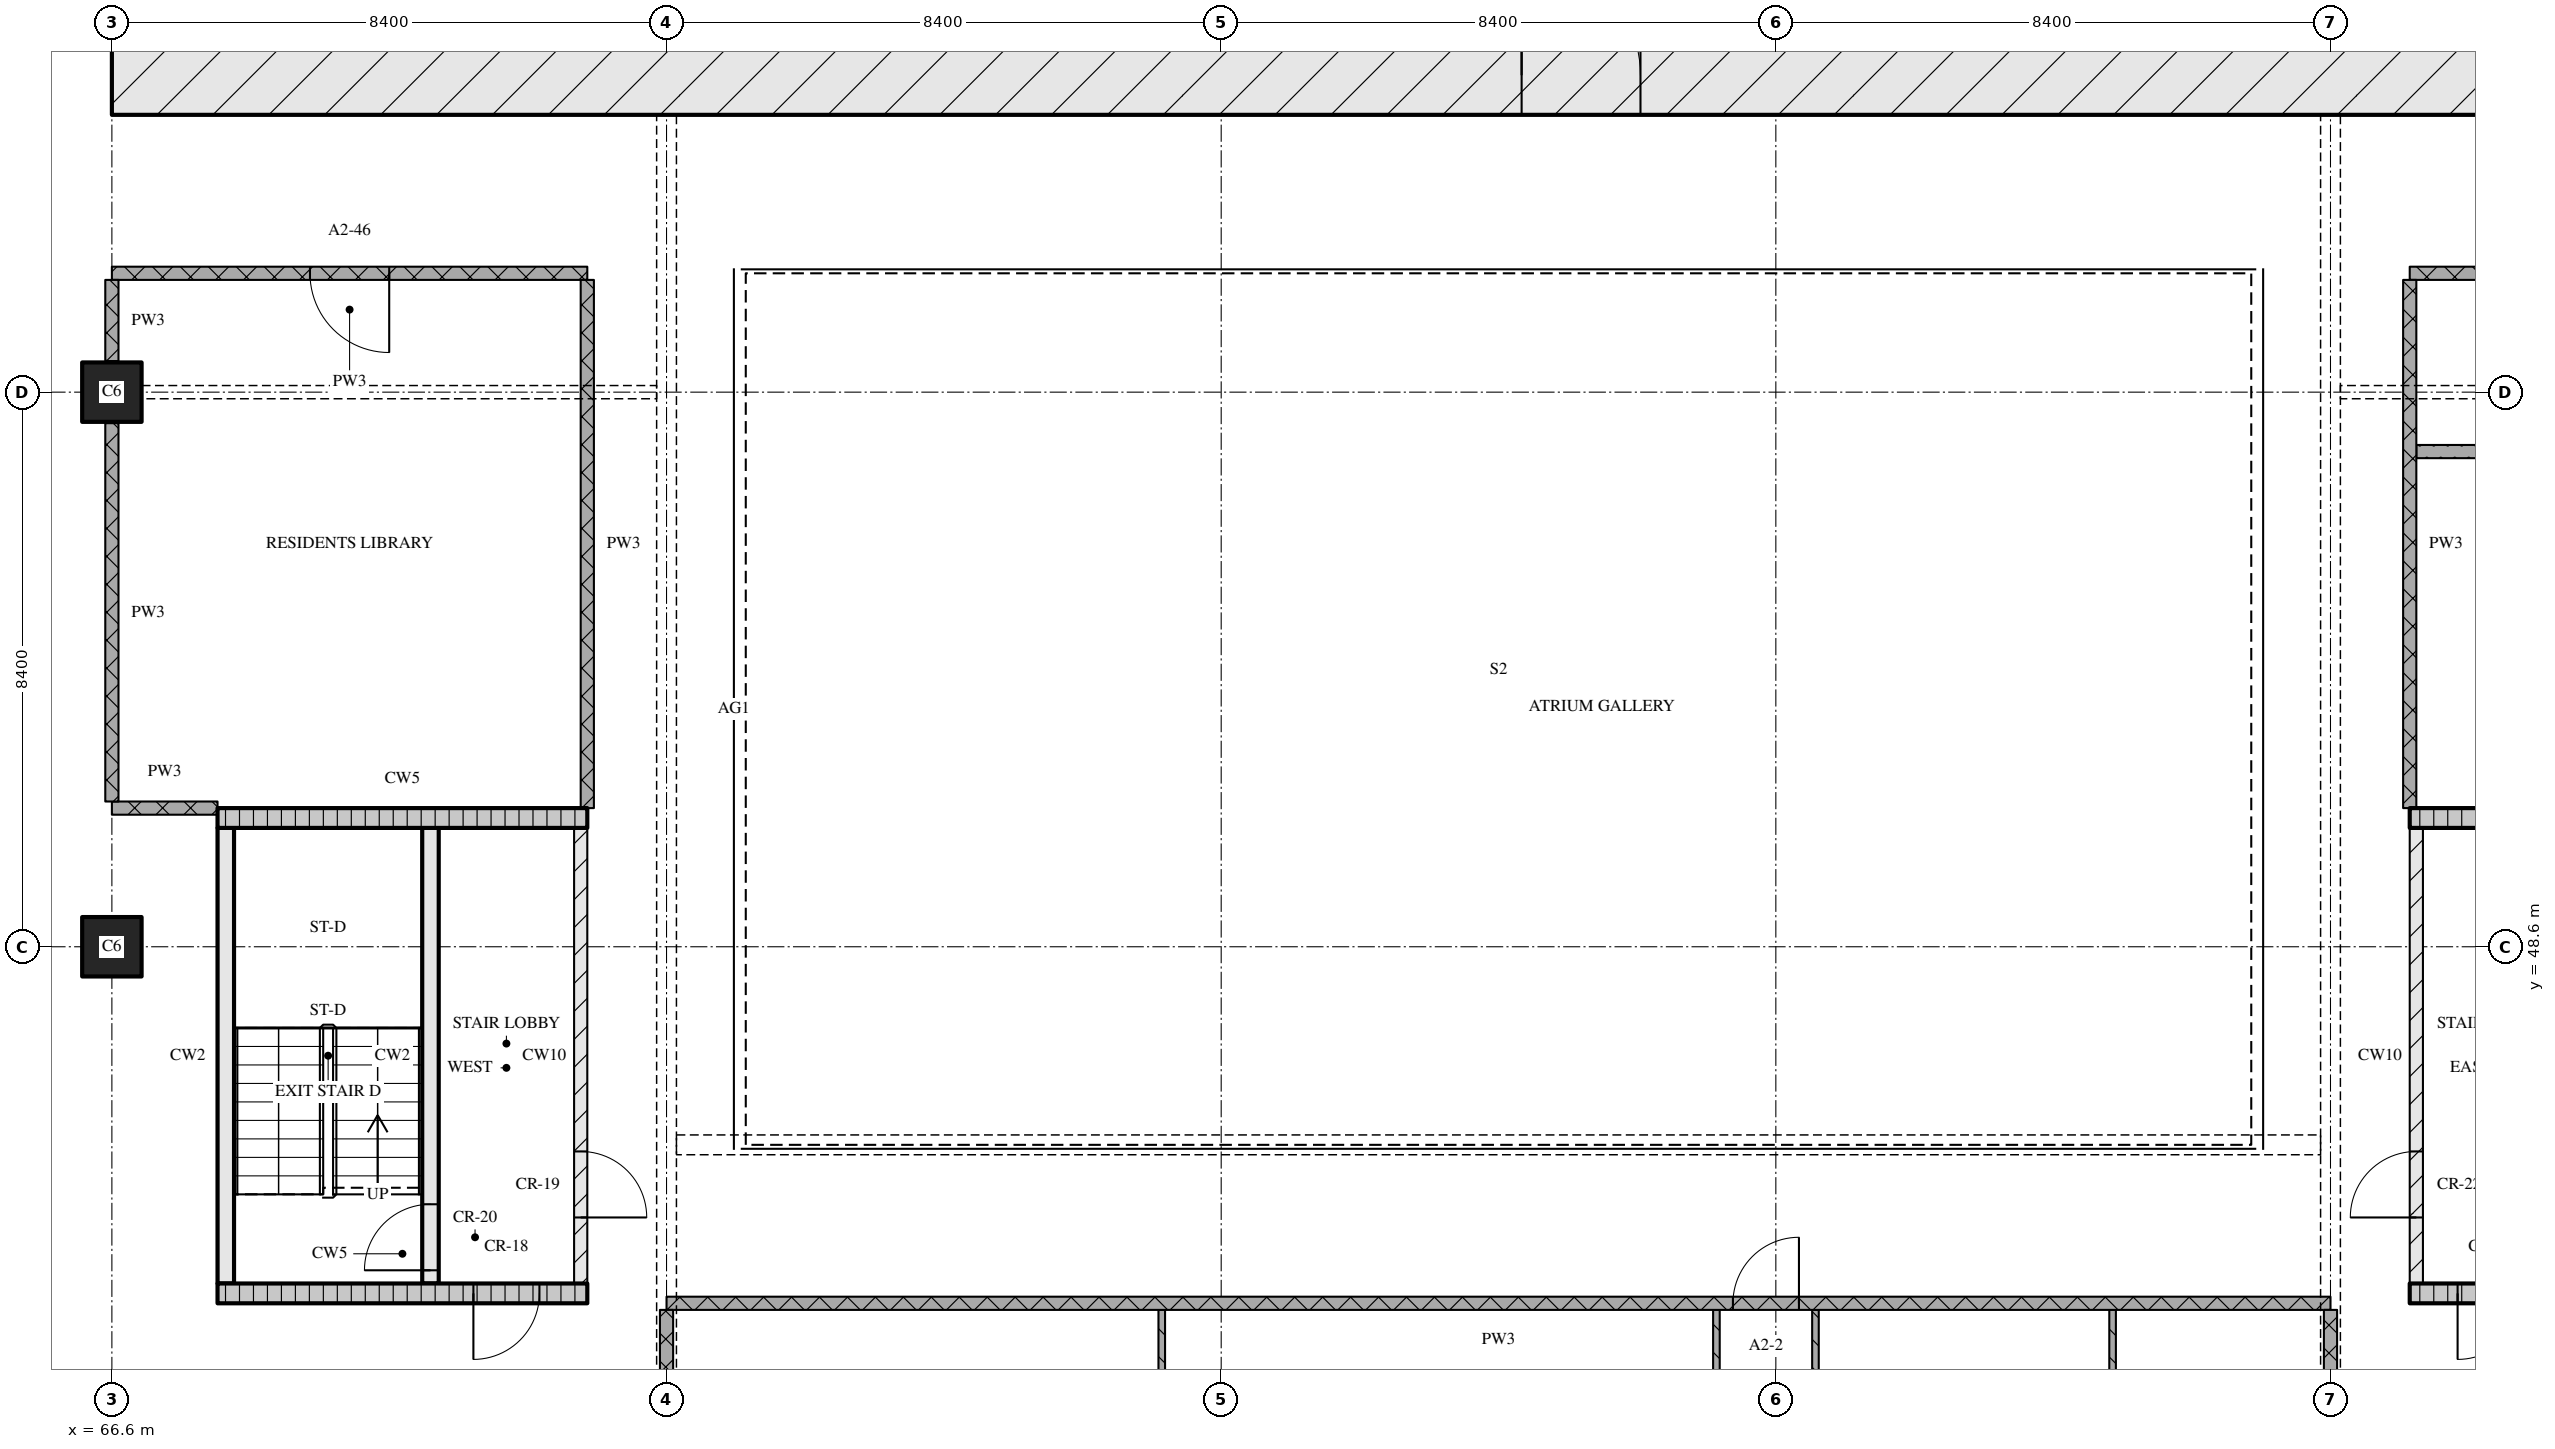
"""IFC4 building model, lengths in metres.
Left out: names, types, materials, properties, quantities, classifications, styles, units other than length and angle.
Written with IfcOpenShell. Run it as: python <this file> out.ifc"""

import sys

from ifc_helpers import new_model, si_unit, direction, frame, frame_2d, origin, origin_2d, place, context, subcontext, project, spatial, rectangle, extrude, element, fill, save


model = new_model("IFC4")
c1 = context("Model", 3, precision=1e-05, world=origin(), true_north=direction((0.0, 1.0)))
c2 = subcontext(c1, "Body", "Model", "MODEL_VIEW")
j1 = project(units=[si_unit("LENGTHUNIT", "METRE"), si_unit("PLANEANGLEUNIT", "RADIAN")], contexts=[c1])
p1 = place(None, origin())
s1 = spatial("IfcSite", under=j1, at=p1, CompositionType="ELEMENT")
p2 = place(p1, origin())
s2 = spatial("IfcBuilding", under=s1, at=p2, CompositionType="ELEMENT")
p3 = place(p2, frame((0.0, 0.0, 51.6)))
s3 = spatial("IfcBuildingStorey", under=s2, at=p3, CompositionType="ELEMENT", Elevation=51.6)
for number, where, z_axis, x_axis in (
    (1, (66.6, 48.6, 0.0), (0.0, 0.0, 1.0), (1.0, 0.0, 0.0)),
    (2, (66.6, 57.0, 0.0), (0.0, 0.0, 1.0), (1.0, 0.0, 0.0)),
):
    element("IfcColumn", number, at=place(p3, frame(where, z_axis=z_axis, x_axis=x_axis)), inside=s3, PredefinedType="COLUMN", context=c2, shape_type="SweptSolid", body=[
        extrude(rectangle(XDim=0.9, YDim=0.9, at=origin_2d()), origin(), (0.0, 0.0, 1.0), 3.6),
    ])
p4 = place(p3, frame((66.6, 61.8, 0.0), z_axis=(0.0, 0.0, 1.0), x_axis=(1.0, 0.0, 0.0)))
e3 = element("IfcWall", 3, at=p4, inside=s3, PredefinedType="SOLIDWALL", context=c2, shape_type="SweptSolid", body=[
    extrude(rectangle(XDim=42.0, YDim=1.2, at=frame_2d((21.0, 0.0))), origin(), (0.0, 0.0, 1.0), 3.32),
])
p5 = place(p4, frame((21.35, 0.0, 0.0)))
e4 = element("IfcOpeningElement", 4, at=p5, cuts=e3, PredefinedType="OPENING", context=c2, shape_type="SweptSolid", body=[
    extrude(rectangle(XDim=1.8, YDim=2.1, at=frame_2d((0.9, 1.05))), frame((0.0, 0.61, 0.0), z_axis=(0.0, -1.0, 0.0), x_axis=(1.0, 0.0, 0.0)), (0.0, 0.0, 1.0), 1.22),
])
p6 = place(p3, frame((68.2, 43.35, 0.0), z_axis=(0.0, 0.0, 1.0), x_axis=(1.0, 0.0, 0.0)))
e5 = element("IfcWall", 5, at=p6, inside=s3, PredefinedType="SOLIDWALL", context=c2, shape_type="SweptSolid", body=[
    extrude(rectangle(XDim=5.6, YDim=0.3, at=frame_2d((2.8, 0.0))), origin(), (0.0, 0.0, 1.0), 3.32),
])
p7 = place(p6, frame((3.875, 0.0, 0.0)))
e6 = element("IfcOpeningElement", 6, at=p7, cuts=e5, PredefinedType="OPENING", context=c2, shape_type="SweptSolid", body=[
    extrude(rectangle(XDim=1.0, YDim=2.1, at=frame_2d((0.5, 1.05))), frame((0.0, 0.16, 0.0), z_axis=(0.0, -1.0, 0.0), x_axis=(1.0, 0.0, 0.0)), (0.0, 0.0, 1.0), 0.32),
])
p8 = place(p3, frame((68.325, 43.5, 0.0), z_axis=(0.0, 0.0, 1.0), x_axis=(0.0, 1.0, 0.0)))
e7 = element("IfcWall", 7, at=p8, inside=s3, PredefinedType="SOLIDWALL", context=c2, shape_type="SweptSolid", body=[
    extrude(rectangle(XDim=6.9, YDim=0.25, at=frame_2d((3.45, 0.0))), origin(), (0.0, 0.0, 1.0), 3.32),
])
p9 = place(p3, frame((71.425, 43.5, 0.0), z_axis=(0.0, 0.0, 1.0), x_axis=(0.0, 1.0, 0.0)))
e8 = element("IfcWall", 8, at=p9, inside=s3, PredefinedType="SOLIDWALL", context=c2, shape_type="SweptSolid", body=[
    extrude(rectangle(XDim=6.9, YDim=0.25, at=frame_2d((3.45, 0.0))), origin(), (0.0, 0.0, 1.0), 3.32),
])
p10 = place(p9, frame((0.2, 0.0, 0.0)))
e9 = element("IfcOpeningElement", 9, at=p10, cuts=e8, PredefinedType="OPENING", context=c2, shape_type="SweptSolid", body=[
    extrude(rectangle(XDim=1.0, YDim=2.1, at=frame_2d((0.5, 1.05))), frame((0.0, 0.135, 0.0), z_axis=(0.0, -1.0, 0.0), x_axis=(1.0, 0.0, 0.0)), (0.0, 0.0, 1.0), 0.27),
])
p11 = place(p3, frame((73.7, 43.5, 0.0), z_axis=(0.0, 0.0, 1.0), x_axis=(0.0, 1.0, 0.0)))
e10 = element("IfcWall", 10, at=p11, inside=s3, PredefinedType="PARTITIONING", context=c2, shape_type="SweptSolid", body=[
    extrude(rectangle(XDim=6.9, YDim=0.2, at=frame_2d((3.45, 0.0))), origin(), (0.0, 0.0, 1.0), 3.32),
])
p12 = place(p11, frame((1.0, 0.0, 0.0)))
e11 = element("IfcOpeningElement", 11, at=p12, cuts=e10, PredefinedType="OPENING", context=c2, shape_type="SweptSolid", body=[
    extrude(rectangle(XDim=1.0, YDim=2.1, at=frame_2d((0.5, 1.05))), frame((0.0, 0.11, 0.0), z_axis=(0.0, -1.0, 0.0), x_axis=(1.0, 0.0, 0.0)), (0.0, 0.0, 1.0), 0.22),
])
p13 = place(p3, frame((68.2, 50.55, 0.0), z_axis=(0.0, 0.0, 1.0), x_axis=(1.0, 0.0, 0.0)))
e12 = element("IfcWall", 12, at=p13, inside=s3, PredefinedType="SOLIDWALL", context=c2, shape_type="SweptSolid", body=[
    extrude(rectangle(XDim=5.6, YDim=0.3, at=frame_2d((2.8, 0.0))), origin(), (0.0, 0.0, 1.0), 3.32),
])
p14 = place(p3, frame((101.4, 43.35, 0.0), z_axis=(0.0, 0.0, 1.0), x_axis=(1.0, 0.0, 0.0)))
e13 = element("IfcWall", 13, at=p14, inside=s3, PredefinedType="SOLIDWALL", context=c2, shape_type="SweptSolid", body=[
    extrude(rectangle(XDim=5.6, YDim=0.3, at=frame_2d((2.8, 0.0))), origin(), (0.0, 0.0, 1.0), 3.32),
])
p15 = place(p14, frame((0.725, 0.0, 0.0)))
e14 = element("IfcOpeningElement", 14, at=p15, cuts=e13, PredefinedType="OPENING", context=c2, shape_type="SweptSolid", body=[
    extrude(rectangle(XDim=1.0, YDim=2.1, at=frame_2d((0.5, 1.05))), frame((0.0, 0.16, 0.0), z_axis=(0.0, -1.0, 0.0), x_axis=(1.0, 0.0, 0.0)), (0.0, 0.0, 1.0), 0.32),
])
p16 = place(p3, frame((101.5, 43.5, 0.0), z_axis=(0.0, 0.0, 1.0), x_axis=(0.0, 1.0, 0.0)))
e15 = element("IfcWall", 15, at=p16, inside=s3, PredefinedType="PARTITIONING", context=c2, shape_type="SweptSolid", body=[
    extrude(rectangle(XDim=6.9, YDim=0.2, at=frame_2d((3.45, 0.0))), origin(), (0.0, 0.0, 1.0), 3.32),
])
p17 = place(p16, frame((1.0, 0.0, 0.0)))
e16 = element("IfcOpeningElement", 16, at=p17, cuts=e15, PredefinedType="OPENING", context=c2, shape_type="SweptSolid", body=[
    extrude(rectangle(XDim=1.0, YDim=2.1, at=frame_2d((0.5, 1.05))), frame((0.0, 0.11, 0.0), z_axis=(0.0, -1.0, 0.0), x_axis=(1.0, 0.0, 0.0)), (0.0, 0.0, 1.0), 0.22),
])
p18 = place(p3, frame((101.4, 50.55, 0.0), z_axis=(0.0, 0.0, 1.0), x_axis=(1.0, 0.0, 0.0)))
e17 = element("IfcWall", 17, at=p18, inside=s3, PredefinedType="SOLIDWALL", context=c2, shape_type="SweptSolid", body=[
    extrude(rectangle(XDim=5.6, YDim=0.3, at=frame_2d((2.8, 0.0))), origin(), (0.0, 0.0, 1.0), 3.32),
])
p19 = place(p3, frame((100.2, 43.2, 0.0), z_axis=(0.0, 0.0, 1.0), x_axis=(-1.0, 0.0, 0.0)))
e18 = element("IfcWall", 18, at=p19, inside=s3, PredefinedType="PARTITIONING", context=c2, shape_type="SweptSolid", body=[
    extrude(rectangle(XDim=25.2, YDim=0.2, at=frame_2d((12.6, 0.0))), origin(), (0.0, 0.0, 1.0), 3.32),
])
p20 = place(p19, frame((8.05, 0.0, 0.0)))
e19 = element("IfcOpeningElement", 19, at=p20, cuts=e18, PredefinedType="OPENING", context=c2, shape_type="SweptSolid", body=[
    extrude(rectangle(XDim=1.0, YDim=2.1, at=frame_2d((0.5, 1.05))), frame((0.0, 0.11, 0.0), z_axis=(0.0, -1.0, 0.0), x_axis=(1.0, 0.0, 0.0)), (0.0, 0.0, 1.0), 0.22),
])
p21 = place(p3, frame((66.6, 50.7, 0.0), z_axis=(0.0, 0.0, 1.0), x_axis=(1.0, 0.0, 0.0)))
e20 = element("IfcWall", 20, at=p21, inside=s3, PredefinedType="PARTITIONING", context=c2, shape_type="SweptSolid", body=[
    extrude(rectangle(XDim=1.6, YDim=0.2, at=frame_2d((0.8, 0.0))), origin(), (0.0, 0.0, 1.0), 3.32),
])
p22 = place(p3, frame((101.5, 56.1, 0.0), z_axis=(0.0, 0.0, 1.0), x_axis=(1.0, 0.0, 0.0)))
e21 = element("IfcWall", 21, at=p22, inside=s3, PredefinedType="PARTITIONING", context=c2, shape_type="SweptSolid", body=[
    extrude(rectangle(XDim=7.0, YDim=0.2, at=frame_2d((3.5, 0.0))), origin(), (0.0, 0.0, 1.0), 3.32),
])
p23 = place(p3, frame((73.8, 58.8, 0.0), z_axis=(0.0, 0.0, 1.0), x_axis=(-1.0, 0.0, 0.0)))
e22 = element("IfcWall", 22, at=p23, inside=s3, PredefinedType="PARTITIONING", context=c2, shape_type="SweptSolid", body=[
    extrude(rectangle(XDim=7.2, YDim=0.2, at=frame_2d((3.6, 0.0))), origin(), (0.0, 0.0, 1.0), 3.32),
])
p24 = place(p23, frame((3.0, 0.0, 0.0)))
e23 = element("IfcOpeningElement", 23, at=p24, cuts=e22, PredefinedType="OPENING", context=c2, shape_type="SweptSolid", body=[
    extrude(rectangle(XDim=1.2, YDim=2.1, at=frame_2d((0.6, 1.05))), frame((0.0, 0.11, 0.0), z_axis=(0.0, -1.0, 0.0), x_axis=(1.0, 0.0, 0.0)), (0.0, 0.0, 1.0), 0.22),
])
p25 = place(p3, frame((101.4, 58.8, 0.0), z_axis=(0.0, 0.0, 1.0), x_axis=(1.0, 0.0, 0.0)))
e24 = element("IfcWall", 24, at=p25, inside=s3, PredefinedType="PARTITIONING", context=c2, shape_type="SweptSolid", body=[
    extrude(rectangle(XDim=7.2, YDim=0.2, at=frame_2d((3.6, 0.0))), origin(), (0.0, 0.0, 1.0), 3.32),
])
p26 = place(p3, frame((66.6, 56.53, 0.0), z_axis=(0.0, 0.0, 1.0), x_axis=(0.0, -1.0, 0.0)))
e25 = element("IfcWall", 25, at=p26, inside=s3, PredefinedType="PARTITIONING", context=c2, shape_type="SweptSolid", body=[
    extrude(rectangle(XDim=5.73, YDim=0.2, at=frame_2d((2.865, 0.0))), origin(), (0.0, 0.0, 1.0), 3.32),
])
p27 = place(p3, frame((66.6, 58.7, 0.0), z_axis=(0.0, 0.0, 1.0), x_axis=(0.0, -1.0, 0.0)))
e26 = element("IfcWall", 26, at=p27, inside=s3, PredefinedType="PARTITIONING", context=c2, shape_type="SweptSolid", body=[
    extrude(rectangle(XDim=1.23, YDim=0.2, at=frame_2d((0.615, 0.0))), origin(), (0.0, 0.0, 1.0), 3.32),
])
p28 = place(p3, frame((73.8, 58.7, 0.0), z_axis=(0.0, 0.0, 1.0), x_axis=(0.0, -1.0, 0.0)))
e27 = element("IfcWall", 27, at=p28, inside=s3, PredefinedType="PARTITIONING", context=c2, shape_type="SweptSolid", body=[
    extrude(rectangle(XDim=8.0, YDim=0.2, at=frame_2d((4.0, 0.0))), origin(), (0.0, 0.0, 1.0), 3.32),
])
p29 = place(p3, frame((75.0, 43.1, 0.0), z_axis=(0.0, 0.0, 1.0), x_axis=(0.0, -1.0, 0.0)))
e28 = element("IfcWall", 28, at=p29, inside=s3, PredefinedType="PARTITIONING", context=c2, shape_type="SweptSolid", body=[
    extrude(rectangle(XDim=2.2, YDim=0.2, at=frame_2d((1.1, 0.0))), origin(), (0.0, 0.0, 1.0), 2.43),
])
p30 = place(p3, frame((82.5, 43.1, 0.0), z_axis=(0.0, 0.0, 1.0), x_axis=(0.0, -1.0, 0.0)))
e29 = element("IfcWall", 29, at=p30, inside=s3, PredefinedType="PARTITIONING", context=c2, shape_type="SweptSolid", body=[
    extrude(rectangle(XDim=4.95, YDim=0.1, at=frame_2d((2.475, 0.0))), origin(), (0.0, 0.0, 1.0), 3.32),
])
p31 = place(p3, frame((90.9, 38.15, 0.0), z_axis=(0.0, 0.0, 1.0), x_axis=(0.0, 1.0, 0.0)))
e30 = element("IfcWall", 30, at=p31, inside=s3, PredefinedType="PARTITIONING", context=c2, shape_type="SweptSolid", body=[
    extrude(rectangle(XDim=4.95, YDim=0.1, at=frame_2d((2.475, 0.0))), origin(), (0.0, 0.0, 1.0), 3.32),
])
p32 = place(p31, frame((2.65, 0.0, 0.0)))
e31 = element("IfcOpeningElement", 31, at=p32, cuts=e30, PredefinedType="OPENING", context=c2, shape_type="SweptSolid", body=[
    extrude(rectangle(XDim=0.9, YDim=2.1, at=frame_2d((0.45, 1.05))), frame((0.0, 0.06, 0.0), z_axis=(0.0, -1.0, 0.0), x_axis=(1.0, 0.0, 0.0)), (0.0, 0.0, 1.0), 0.12),
])
p33 = place(p3, frame((92.4, 43.1, 0.0), z_axis=(0.0, 0.0, 1.0), x_axis=(0.0, -1.0, 0.0)))
e32 = element("IfcWall", 32, at=p33, inside=s3, PredefinedType="PARTITIONING", context=c2, shape_type="SweptSolid", body=[
    extrude(rectangle(XDim=4.95, YDim=0.1, at=frame_2d((2.475, 0.0))), origin(), (0.0, 0.0, 1.0), 3.32),
])
p34 = place(p33, frame((1.6, 0.0, 0.0)))
e33 = element("IfcOpeningElement", 33, at=p34, cuts=e32, PredefinedType="OPENING", context=c2, shape_type="SweptSolid", body=[
    extrude(rectangle(XDim=0.8, YDim=2.1, at=frame_2d((0.4, 1.05))), frame((0.0, 0.06, 0.0), z_axis=(0.0, -1.0, 0.0), x_axis=(1.0, 0.0, 0.0)), (0.0, 0.0, 1.0), 0.12),
])
p35 = place(p3, frame((96.9, 43.1, 0.0), z_axis=(0.0, 0.0, 1.0), x_axis=(0.0, -1.0, 0.0)))
e34 = element("IfcWall", 34, at=p35, inside=s3, PredefinedType="PARTITIONING", context=c2, shape_type="SweptSolid", body=[
    extrude(rectangle(XDim=4.95, YDim=0.1, at=frame_2d((2.475, 0.0))), origin(), (0.0, 0.0, 1.0), 3.32),
])
p36 = place(p3, frame((100.2, 43.1, 0.0), z_axis=(0.0, 0.0, 1.0), x_axis=(0.0, -1.0, 0.0)))
e35 = element("IfcWall", 35, at=p36, inside=s3, PredefinedType="PARTITIONING", context=c2, shape_type="SweptSolid", body=[
    extrude(rectangle(XDim=2.2, YDim=0.2, at=frame_2d((1.1, 0.0))), origin(), (0.0, 0.0, 1.0), 2.43),
])
p37 = place(p3, frame((101.4, 58.7, 0.0), z_axis=(0.0, 0.0, 1.0), x_axis=(0.0, -1.0, 0.0)))
e36 = element("IfcWall", 36, at=p37, inside=s3, PredefinedType="PARTITIONING", context=c2, shape_type="SweptSolid", body=[
    extrude(rectangle(XDim=8.0, YDim=0.2, at=frame_2d((4.0, 0.0))), origin(), (0.0, 0.0, 1.0), 3.32),
])
p38 = place(p5, origin())
e37 = element("IfcDoor", 37, at=p38, inside=s3, OperationType="DOUBLE_DOOR_SINGLE_SWING", PredefinedType="DOOR", context=c2, shape_type="SweptSolid", body=[
    extrude(rectangle(XDim=1.8, YDim=2.1, at=frame_2d((0.9, 1.05))), frame((0.0, 0.025, 0.0), z_axis=(0.0, -1.0, 0.0), x_axis=(1.0, 0.0, 0.0)), (0.0, 0.0, 1.0), 0.05),
])
fill(e4, e37)
p39 = place(p7, origin())
e38 = element("IfcDoor", 38, at=p39, inside=s3, OperationType="SINGLE_SWING_RIGHT", PredefinedType="DOOR", context=c2, shape_type="SweptSolid", body=[
    extrude(rectangle(XDim=1.0, YDim=2.1, at=frame_2d((0.5, 1.05))), frame((0.0, 0.025, 0.0), z_axis=(0.0, -1.0, 0.0), x_axis=(1.0, 0.0, 0.0)), (0.0, 0.0, 1.0), 0.05),
])
fill(e6, e38)
p40 = place(p10, origin())
e39 = element("IfcDoor", 39, at=p40, inside=s3, OperationType="SINGLE_SWING_LEFT", PredefinedType="DOOR", context=c2, shape_type="SweptSolid", body=[
    extrude(rectangle(XDim=1.0, YDim=2.1, at=frame_2d((0.5, 1.05))), frame((0.0, 0.025, 0.0), z_axis=(0.0, -1.0, 0.0), x_axis=(1.0, 0.0, 0.0)), (0.0, 0.0, 1.0), 0.05),
])
fill(e9, e39)
p41 = place(p12, origin())
e40 = element("IfcDoor", 40, at=p41, inside=s3, OperationType="SINGLE_SWING_RIGHT", PredefinedType="DOOR", context=c2, shape_type="SweptSolid", body=[
    extrude(rectangle(XDim=1.0, YDim=2.1, at=frame_2d((0.5, 1.05))), frame((0.0, 0.025, 0.0), z_axis=(0.0, -1.0, 0.0), x_axis=(1.0, 0.0, 0.0)), (0.0, 0.0, 1.0), 0.05),
])
fill(e11, e40)
p42 = place(p15, origin())
e41 = element("IfcDoor", 41, at=p42, inside=s3, OperationType="SINGLE_SWING_RIGHT", PredefinedType="DOOR", context=c2, shape_type="SweptSolid", body=[
    extrude(rectangle(XDim=1.0, YDim=2.1, at=frame_2d((0.5, 1.05))), frame((0.0, 0.025, 0.0), z_axis=(0.0, -1.0, 0.0), x_axis=(1.0, 0.0, 0.0)), (0.0, 0.0, 1.0), 0.05),
])
fill(e14, e41)
p43 = place(p17, origin())
e42 = element("IfcDoor", 42, at=p43, inside=s3, OperationType="SINGLE_SWING_LEFT", PredefinedType="DOOR", context=c2, shape_type="SweptSolid", body=[
    extrude(rectangle(XDim=1.0, YDim=2.1, at=frame_2d((0.5, 1.05))), frame((0.0, 0.025, 0.0), z_axis=(0.0, -1.0, 0.0), x_axis=(1.0, 0.0, 0.0)), (0.0, 0.0, 1.0), 0.05),
])
fill(e16, e42)
p44 = place(p20, origin())
e43 = element("IfcDoor", 43, at=p44, inside=s3, OperationType="SINGLE_SWING_RIGHT", PredefinedType="DOOR", context=c2, shape_type="SweptSolid", body=[
    extrude(rectangle(XDim=1.0, YDim=2.1, at=frame_2d((0.5, 1.05))), frame((0.0, 0.025, 0.0), z_axis=(0.0, -1.0, 0.0), x_axis=(1.0, 0.0, 0.0)), (0.0, 0.0, 1.0), 0.05),
])
fill(e19, e43)
p45 = place(p24, origin())
e44 = element("IfcDoor", 44, at=p45, inside=s3, OperationType="SINGLE_SWING_LEFT", PredefinedType="DOOR", context=c2, shape_type="SweptSolid", body=[
    extrude(rectangle(XDim=1.2, YDim=2.1, at=frame_2d((0.6, 1.05))), frame((0.0, 0.025, 0.0), z_axis=(0.0, -1.0, 0.0), x_axis=(1.0, 0.0, 0.0)), (0.0, 0.0, 1.0), 0.05),
])
fill(e23, e44)
save(model, sys.argv[1])
